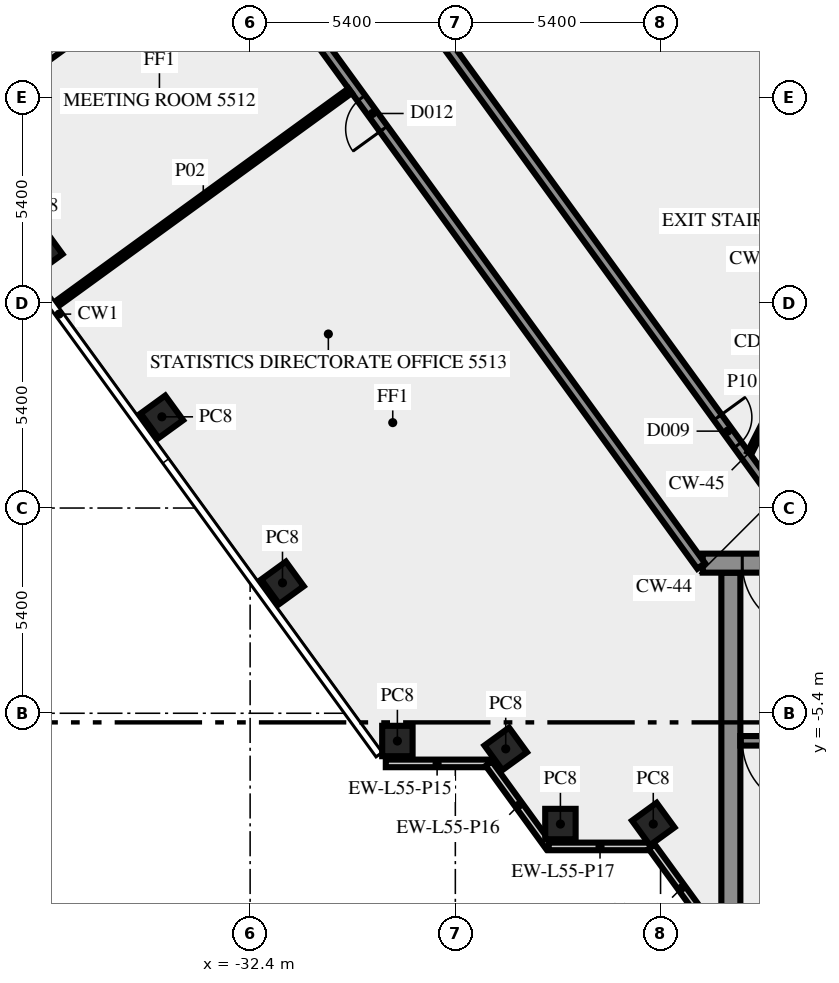
"""IFC4 building model, lengths in metres.
Left out: names, types, materials, properties, quantities, classifications, styles, units other than length and angle.
Written with IfcOpenShell. Run it as: python <this file> out.ifc"""

import sys

from ifc_helpers import new_model, si_unit, direction, frame, frame_2d, origin, origin_2d, place, context, subcontext, project, spatial, rectangle, extrude, element, fill, save


model = new_model("IFC4")
c1 = context("Model", 3, precision=1e-05, world=origin(), true_north=direction((0.0, 1.0)))
c2 = subcontext(c1, "Body", "Model", "MODEL_VIEW")
j1 = project(units=[si_unit("LENGTHUNIT", "METRE"), si_unit("PLANEANGLEUNIT", "RADIAN")], contexts=[c1])
p1 = place(None, origin())
s1 = spatial("IfcSite", under=j1, at=p1, CompositionType="ELEMENT")
p2 = place(p1, origin())
s2 = spatial("IfcBuilding", under=s1, at=p2, CompositionType="ELEMENT")
p3 = place(p2, frame((0.0, 0.0, 234.0)))
s3 = spatial("IfcBuildingStorey", under=s2, at=p3, CompositionType="ELEMENT", Elevation=234.0)
for number, where, z_axis, x_axis in (
    (1, (-37.896, 6.769, 0.0), (0.0, 0.0, 1.0), (0.588, -0.809, 0.0)),
    (2, (-34.722, 2.4, 0.0), (0.0, 0.0, 1.0), (0.588, -0.809, 0.0)),
    (3, (-31.548, -1.969, 0.0), (0.0, 0.0, 1.0), (0.588, -0.809, 0.0)),
    (4, (-28.525, -6.13, 0.0), (0.0, 0.0, 1.0), (1.0, 0.0, 0.0)),
    (5, (-25.674, -6.337, 0.0), (0.0, 0.0, 1.0), (0.588, -0.809, 0.0)),
    (6, (-24.235, -8.315, 0.0), (0.0, 0.0, 1.0), (1.0, 0.0, 0.0)),
    (7, (-21.792, -8.315, 0.0), (0.0, 0.0, 1.0), (0.588, -0.809, 0.0)),
):
    element("IfcColumn", number, at=place(p3, frame(where, z_axis=z_axis, x_axis=x_axis)), inside=s3, PredefinedType="COLUMN", context=c2, shape_type="SweptSolid", body=[
        extrude(rectangle(XDim=0.8, YDim=0.8, at=origin_2d()), origin(), (0.0, 0.0, 1.0), 3.65),
    ])
p4 = place(p3, frame((-28.83, -6.719, 0.0), z_axis=(0.0, 0.0, 1.0), x_axis=(1.0, 0.0, 0.0)))
e8 = element("IfcWall", 8, at=p4, inside=s3, PredefinedType="SOLIDWALL", context=c2, shape_type="SweptSolid", body=[
    extrude(rectangle(XDim=2.7, YDim=0.2, at=frame_2d((1.35, 0.0))), origin(), (0.0, 0.0, 1.0), 3.65),
])
p5 = place(p3, frame((-26.12, -6.724, 0.0), z_axis=(0.0, 0.0, 1.0), x_axis=(0.587720002413, -0.809064397168, 0.0)))
e9 = element("IfcWall", 9, at=p5, inside=s3, PredefinedType="SOLIDWALL", context=c2, shape_type="SweptSolid", body=[
    extrude(rectangle(XDim=2.7, YDim=0.2, at=frame_2d((1.35, 0.0))), origin(), (0.0, 0.0, 1.0), 3.65),
])
p6 = place(p3, frame((-24.543, -8.904, 0.0), z_axis=(0.0, 0.0, 1.0), x_axis=(1.0, 0.0, 0.0)))
e10 = element("IfcWall", 10, at=p6, inside=s3, PredefinedType="SOLIDWALL", context=c2, shape_type="SweptSolid", body=[
    extrude(rectangle(XDim=2.7, YDim=0.2, at=frame_2d((1.35, 0.0))), origin(), (0.0, 0.0, 1.0), 3.65),
])
p7 = place(p3, frame((-21.833, -8.909, 0.0), z_axis=(0.0, 0.0, 1.0), x_axis=(0.587766567315, -0.809030569476, 0.0)))
e11 = element("IfcWall", 11, at=p7, inside=s3, PredefinedType="SOLIDWALL", context=c2, shape_type="SweptSolid", body=[
    extrude(rectangle(XDim=2.688, YDim=0.2, at=frame_2d((1.344, 0.0))), origin(), (0.0, 0.0, 1.0), 3.65),
])
p8 = place(p3, frame((-19.75, -10.5, 0.0), z_axis=(0.0, 0.0, 1.0), x_axis=(0.0, 1.0, 0.0)))
e12 = element("IfcWall", 12, at=p8, inside=s3, PredefinedType="SHEAR", context=c2, shape_type="SweptSolid", body=[
    extrude(rectangle(XDim=8.8, YDim=0.5, at=frame_2d((4.4, 0.0))), origin(), (0.0, 0.0, 1.0), 3.65),
])
p9 = place(p3, frame((-11.45, -6.125, 0.0), z_axis=(0.0, 0.0, 1.0), x_axis=(-1.0, 0.0, 0.0)))
e13 = element("IfcWall", 13, at=p9, inside=s3, PredefinedType="SHEAR", context=c2, shape_type="SweptSolid", body=[
    extrude(rectangle(XDim=8.05, YDim=0.25, at=frame_2d((4.025, 0.0))), origin(), (0.0, 0.0, 1.0), 3.65),
])
p10 = place(p9, frame((6.2, 0.0, 0.0)))
e14 = element("IfcOpeningElement", 14, at=p10, cuts=e13, PredefinedType="OPENING", context=c2, shape_type="SweptSolid", body=[
    extrude(rectangle(XDim=1.8, YDim=2.1, at=frame_2d((0.9, 1.05))), frame((0.0, 0.135, 0.0), z_axis=(0.0, -1.0, 0.0), x_axis=(1.0, 0.0, 0.0)), (0.0, 0.0, 1.0), 0.27),
])
p11 = place(p3, frame((20.49, -1.45, 0.0), z_axis=(0.0, 0.0, 1.0), x_axis=(-1.0, 0.0, 0.0)))
e15 = element("IfcWall", 15, at=p11, inside=s3, PredefinedType="SHEAR", context=c2, shape_type="SweptSolid", body=[
    extrude(rectangle(XDim=40.98, YDim=0.5, at=frame_2d((20.49, 0.0))), origin(), (0.0, 0.0, 1.0), 3.65),
])
p12 = place(p11, frame((38.14, 0.0, 0.0)))
e16 = element("IfcOpeningElement", 16, at=p12, cuts=e15, PredefinedType="OPENING", context=c2, shape_type="SweptSolid", body=[
    extrude(rectangle(XDim=1.8, YDim=2.1, at=frame_2d((0.9, 1.05))), frame((0.0, 0.26, 0.0), z_axis=(0.0, -1.0, 0.0), x_axis=(1.0, 0.0, 0.0)), (0.0, 0.0, 1.0), 0.52),
])
p13 = place(p11, frame((36.728, 0.0, 0.0)))
e17 = element("IfcOpeningElement", 17, at=p13, cuts=e15, PredefinedType="OPENING", context=c2, shape_type="SweptSolid", body=[
    extrude(rectangle(XDim=0.8, YDim=2.1, at=frame_2d((0.4, 1.05))), frame((0.0, 0.26, 0.0), z_axis=(0.0, -1.0, 0.0), x_axis=(1.0, 0.0, 0.0)), (0.0, 0.0, 1.0), 0.52),
])
p14 = place(p11, frame((35.153, 0.0, 0.0)))
e18 = element("IfcOpeningElement", 18, at=p14, cuts=e15, PredefinedType="OPENING", context=c2, shape_type="SweptSolid", body=[
    extrude(rectangle(XDim=0.8, YDim=2.1, at=frame_2d((0.4, 1.05))), frame((0.0, 0.26, 0.0), z_axis=(0.0, -1.0, 0.0), x_axis=(1.0, 0.0, 0.0)), (0.0, 0.0, 1.0), 0.52),
])
p15 = place(p11, frame((32.94, 0.0, 0.0)))
e19 = element("IfcOpeningElement", 19, at=p15, cuts=e15, PredefinedType="OPENING", context=c2, shape_type="SweptSolid", body=[
    extrude(rectangle(XDim=0.9, YDim=2.1, at=frame_2d((0.45, 1.05))), frame((0.0, 0.26, 0.0), z_axis=(0.0, -1.0, 0.0), x_axis=(1.0, 0.0, 0.0)), (0.0, 0.0, 1.0), 0.52),
])
p16 = place(p11, frame((29.603, 0.0, 0.0)))
e20 = element("IfcOpeningElement", 20, at=p16, cuts=e15, PredefinedType="OPENING", context=c2, shape_type="SweptSolid", body=[
    extrude(rectangle(XDim=0.9, YDim=2.1, at=frame_2d((0.45, 1.05))), frame((0.0, 0.26, 0.0), z_axis=(0.0, -1.0, 0.0), x_axis=(1.0, 0.0, 0.0)), (0.0, 0.0, 1.0), 0.52),
])
p17 = place(p11, frame((25.877, 0.0, 0.0)))
e21 = element("IfcOpeningElement", 21, at=p17, cuts=e15, PredefinedType="OPENING", context=c2, shape_type="SweptSolid", body=[
    extrude(rectangle(XDim=0.9, YDim=2.1, at=frame_2d((0.45, 1.05))), frame((0.0, 0.26, 0.0), z_axis=(0.0, -1.0, 0.0), x_axis=(1.0, 0.0, 0.0)), (0.0, 0.0, 1.0), 0.52),
])
p18 = place(p11, frame((19.59, 0.0, 0.0)))
e22 = element("IfcOpeningElement", 22, at=p18, cuts=e15, PredefinedType="OPENING", context=c2, shape_type="SweptSolid", body=[
    extrude(rectangle(XDim=2.0, YDim=2.1, at=frame_2d((1.0, 1.05))), frame((0.0, 0.26, 0.0), z_axis=(0.0, -1.0, 0.0), x_axis=(1.0, 0.0, 0.0)), (0.0, 0.0, 1.0), 0.52),
])
p19 = place(p11, frame((7.14, 0.0, 0.0)))
e23 = element("IfcOpeningElement", 23, at=p19, cuts=e15, PredefinedType="OPENING", context=c2, shape_type="SweptSolid", body=[
    extrude(rectangle(XDim=0.9, YDim=2.1, at=frame_2d((0.45, 1.05))), frame((0.0, 0.26, 0.0), z_axis=(0.0, -1.0, 0.0), x_axis=(1.0, 0.0, 0.0)), (0.0, 0.0, 1.0), 0.52),
])
p20 = place(p11, frame((4.19, 0.0, 0.0)))
e24 = element("IfcOpeningElement", 24, at=p20, cuts=e15, PredefinedType="OPENING", context=c2, shape_type="SweptSolid", body=[
    extrude(rectangle(XDim=0.9, YDim=2.1, at=frame_2d((0.45, 1.05))), frame((0.0, 0.26, 0.0), z_axis=(0.0, -1.0, 0.0), x_axis=(1.0, 0.0, 0.0)), (0.0, 0.0, 1.0), 0.52),
])
p21 = place(p11, frame((1.04, 0.0, 0.0)))
e25 = element("IfcOpeningElement", 25, at=p21, cuts=e15, PredefinedType="OPENING", context=c2, shape_type="SweptSolid", body=[
    extrude(rectangle(XDim=1.8, YDim=2.1, at=frame_2d((0.9, 1.05))), frame((0.0, 0.26, 0.0), z_axis=(0.0, -1.0, 0.0), x_axis=(1.0, 0.0, 0.0)), (0.0, 0.0, 1.0), 0.52),
])
p22 = place(p3, frame((-20.531, -1.523, 0.0), z_axis=(0.0, 0.0, 1.0), x_axis=(-0.587781654618, 0.809019608226, 0.0)))
e26 = element("IfcWall", 26, at=p22, inside=s3, PredefinedType="SOLIDWALL", context=c2, shape_type="SweptSolid", body=[
    extrude(rectangle(XDim=33.911, YDim=0.25, at=frame_2d((16.956, 0.0))), origin(), (0.0, 0.0, 1.0), 3.65),
])
p23 = place(p22, frame((14.216, 0.0, 0.0)))
e27 = element("IfcOpeningElement", 27, at=p23, cuts=e26, PredefinedType="OPENING", context=c2, shape_type="SweptSolid", body=[
    extrude(rectangle(XDim=1.0, YDim=2.1, at=frame_2d((0.5, 1.05))), frame((0.0, 0.135, 0.0), z_axis=(0.0, -1.0, 0.0), x_axis=(1.0, 0.0, 0.0)), (0.0, 0.0, 1.0), 0.27),
])
p24 = place(p22, frame((19.715, 0.0, 0.0)))
e28 = element("IfcOpeningElement", 28, at=p24, cuts=e26, PredefinedType="OPENING", context=c2, shape_type="SweptSolid", body=[
    extrude(rectangle(XDim=0.9, YDim=2.1, at=frame_2d((0.45, 1.05))), frame((0.0, 0.135, 0.0), z_axis=(0.0, -1.0, 0.0), x_axis=(1.0, 0.0, 0.0)), (0.0, 0.0, 1.0), 0.27),
])
p25 = place(p22, frame((21.316, 0.0, 0.0)))
e29 = element("IfcOpeningElement", 29, at=p25, cuts=e26, PredefinedType="OPENING", context=c2, shape_type="SweptSolid", body=[
    extrude(rectangle(XDim=0.9, YDim=2.1, at=frame_2d((0.45, 1.05))), frame((0.0, 0.135, 0.0), z_axis=(0.0, -1.0, 0.0), x_axis=(1.0, 0.0, 0.0)), (0.0, 0.0, 1.0), 0.27),
])
p26 = place(p3, frame((-38.32, 27.469, 0.0), z_axis=(0.0, 0.0, 1.0), x_axis=(0.587788021768, -0.809014982226, 0.0)))
e30 = element("IfcWall", 30, at=p26, inside=s3, PredefinedType="SOLIDWALL", context=c2, shape_type="SweptSolid", body=[
    extrude(rectangle(XDim=35.344, YDim=0.25, at=frame_2d((17.672, 0.0))), origin(), (0.0, 0.0, 1.0), 3.65),
])
p27 = place(p26, frame((31.003, 0.0, 0.0)))
e31 = element("IfcOpeningElement", 31, at=p27, cuts=e30, PredefinedType="OPENING", context=c2, shape_type="SweptSolid", body=[
    extrude(rectangle(XDim=0.9, YDim=2.1, at=frame_2d((0.45, 1.05))), frame((0.0, 0.135, 0.0), z_axis=(0.0, -1.0, 0.0), x_axis=(1.0, 0.0, 0.0)), (0.0, 0.0, 1.0), 0.27),
])
p28 = place(p26, frame((11.286, 0.0, 0.0)))
e32 = element("IfcOpeningElement", 32, at=p28, cuts=e30, PredefinedType="OPENING", context=c2, shape_type="SweptSolid", body=[
    extrude(rectangle(XDim=0.9, YDim=2.1, at=frame_2d((0.45, 1.05))), frame((0.0, 0.135, 0.0), z_axis=(0.0, -1.0, 0.0), x_axis=(1.0, 0.0, 0.0)), (0.0, 0.0, 1.0), 0.27),
])
p29 = place(p3, frame((-29.769, 10.98, 0.0), z_axis=(0.0, 0.0, 1.0), x_axis=(-0.809048817734, -0.587741448702, 0.0)))
e33 = element("IfcWall", 33, at=p29, inside=s3, PredefinedType="PARTITIONING", context=c2, shape_type="SweptSolid", body=[
    extrude(rectangle(XDim=9.55, YDim=0.15, at=frame_2d((4.775, 0.0))), origin(), (0.0, 0.0, 1.0), 2.85),
])
p30 = place(p3, frame((-32.943, 15.349, 0.0), z_axis=(0.0, 0.0, 1.0), x_axis=(-0.80903787798, -0.587756507402, 0.0)))
e34 = element("IfcWall", 34, at=p30, inside=s3, PredefinedType="SOLIDWALL", context=c2, shape_type="SweptSolid", body=[
    extrude(rectangle(XDim=9.652, YDim=0.2, at=frame_2d((4.826, 0.0))), origin(), (0.0, 0.0, 1.0), 2.85),
])
p31 = place(p3, frame((-19.261, 1.45, 0.0), z_axis=(0.0, 0.0, 1.0), x_axis=(0.453950796792, 0.891026752736, 0.0)))
e35 = element("IfcWall", 35, at=p31, inside=s3, PredefinedType="PARTITIONING", context=c2, shape_type="SweptSolid", body=[
    extrude(rectangle(XDim=2.778, YDim=0.12, at=frame_2d((1.389, 0.0))), origin(), (0.0, 0.0, 1.0), 3.65),
])
p32 = place(p10, origin())
e36 = element("IfcDoor", 36, at=p32, inside=s3, OperationType="DOUBLE_DOOR_SINGLE_SWING", PredefinedType="DOOR", context=c2, shape_type="SweptSolid", body=[
    extrude(rectangle(XDim=1.8, YDim=2.1, at=frame_2d((0.9, 1.05))), frame((0.0, 0.025, 0.0), z_axis=(0.0, -1.0, 0.0), x_axis=(1.0, 0.0, 0.0)), (0.0, 0.0, 1.0), 0.05),
])
fill(e14, e36)
p33 = place(p12, origin())
e37 = element("IfcDoor", 37, at=p33, inside=s3, OperationType="DOUBLE_DOOR_SINGLE_SWING", PredefinedType="DOOR", context=c2, shape_type="SweptSolid", body=[
    extrude(rectangle(XDim=1.8, YDim=2.1, at=frame_2d((0.9, 1.05))), frame((0.0, 0.025, 0.0), z_axis=(0.0, -1.0, 0.0), x_axis=(1.0, 0.0, 0.0)), (0.0, 0.0, 1.0), 0.05),
])
fill(e16, e37)
p34 = place(p23, origin())
e38 = element("IfcDoor", 38, at=p34, inside=s3, OperationType="SINGLE_SWING_RIGHT", PredefinedType="DOOR", context=c2, shape_type="SweptSolid", body=[
    extrude(rectangle(XDim=1.0, YDim=2.1, at=frame_2d((0.5, 1.05))), frame((0.0, 0.025, 0.0), z_axis=(0.0, -1.0, 0.0), x_axis=(1.0, 0.0, 0.0)), (0.0, 0.0, 1.0), 0.05),
])
fill(e27, e38)
p35 = place(p27, origin())
e39 = element("IfcDoor", 39, at=p35, inside=s3, OperationType="SINGLE_SWING_RIGHT", PredefinedType="DOOR", context=c2, shape_type="SweptSolid", body=[
    extrude(rectangle(XDim=0.9, YDim=2.1, at=frame_2d((0.45, 1.05))), frame((0.0, 0.025, 0.0), z_axis=(0.0, -1.0, 0.0), x_axis=(1.0, 0.0, 0.0)), (0.0, 0.0, 1.0), 0.05),
])
fill(e31, e39)
save(model, sys.argv[1])
